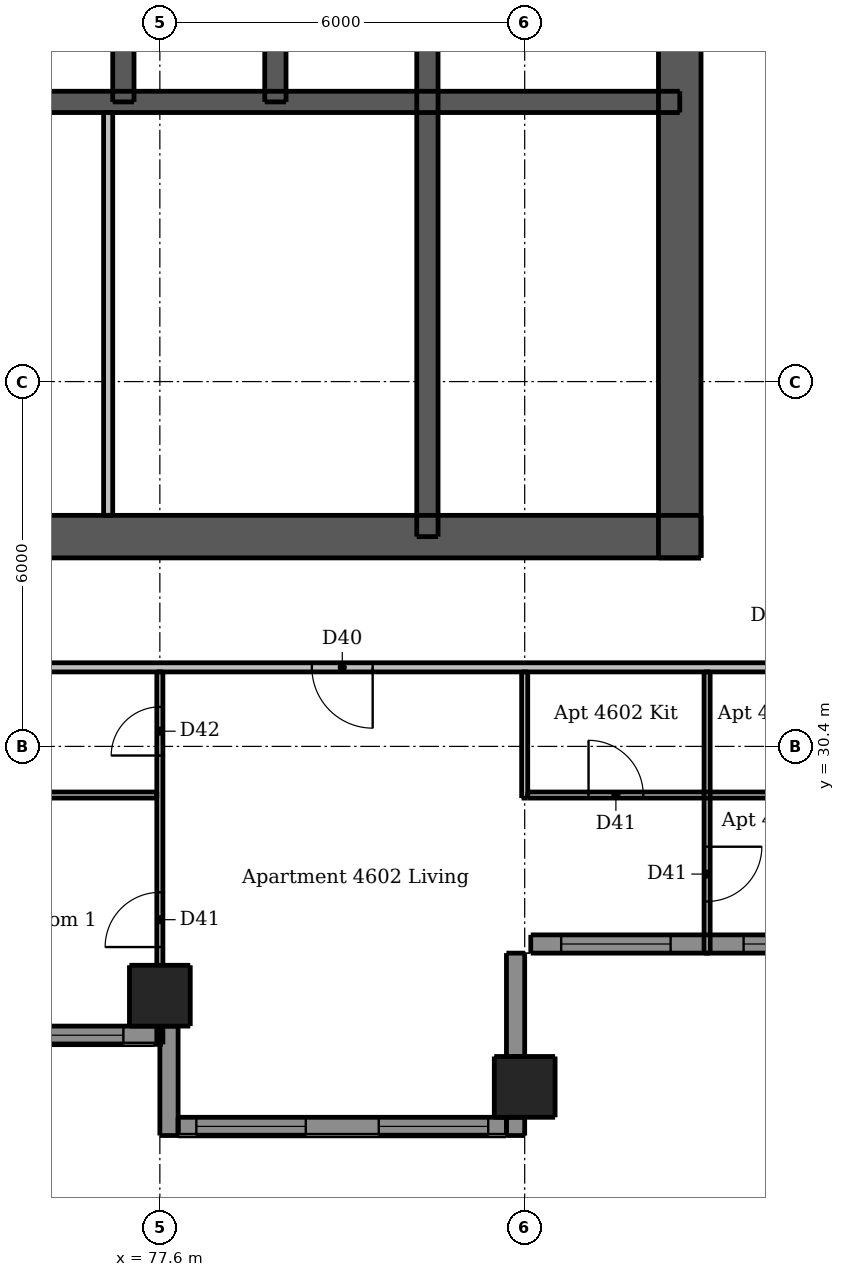
"""IFC4 building model, lengths in metres.
Left out: names, types, materials, properties, quantities, classifications, styles, units other than length and angle.
Written with IfcOpenShell. Run it as: python <this file> out.ifc"""

import sys

from ifc_helpers import new_model, si_unit, direction, frame, frame_2d, origin, origin_2d, place, context, subcontext, project, spatial, rectangle, extrude, element, fill, save


model = new_model("IFC4")
c1 = context("Model", 3, precision=1e-05, world=origin(), true_north=direction((0.0, 1.0)))
c2 = subcontext(c1, "Body", "Model", "MODEL_VIEW")
j1 = project(units=[si_unit("LENGTHUNIT", "METRE"), si_unit("PLANEANGLEUNIT", "RADIAN")], contexts=[c1])
p1 = place(None, origin())
s1 = spatial("IfcSite", under=j1, at=p1, CompositionType="ELEMENT")
p2 = place(p1, origin())
s2 = spatial("IfcBuilding", under=s1, at=p2, CompositionType="ELEMENT")
p3 = place(p2, frame((0.0, 0.0, 171.4)))
s3 = spatial("IfcBuildingStorey", under=s2, at=p3, CompositionType="ELEMENT", Elevation=171.4)
p4 = place(p3, frame((62.5, 33.85, 0.0), z_axis=(0.0, 0.0, 1.0), x_axis=(1.0, 0.0, 0.0)))
e1 = element("IfcWall", 1, at=p4, inside=s3, PredefinedType="SHEAR", context=c2, shape_type="SweptSolid", body=[
    extrude(rectangle(XDim=24.0, YDim=0.7, at=frame_2d((12.0, 0.0))), origin(), (0.0, 0.0, 1.0), 3.05),
])
p5 = place(p4, frame((1.962, 0.0, 0.0)))
e2 = element("IfcOpeningElement", 2, at=p5, cuts=e1, PredefinedType="OPENING", context=c2, shape_type="SweptSolid", body=[
    extrude(rectangle(XDim=1.1, YDim=2.1, at=frame_2d((0.55, 1.05))), frame((0.0, 0.36, 0.0), z_axis=(0.0, -1.0, 0.0), x_axis=(1.0, 0.0, 0.0)), (0.0, 0.0, 1.0), 0.72),
])
p6 = place(p4, frame((20.938, 0.0, 0.0)))
e3 = element("IfcOpeningElement", 3, at=p6, cuts=e1, PredefinedType="OPENING", context=c2, shape_type="SweptSolid", body=[
    extrude(rectangle(XDim=1.1, YDim=2.1, at=frame_2d((0.55, 1.05))), frame((0.0, 0.36, 0.0), z_axis=(0.0, -1.0, 0.0), x_axis=(1.0, 0.0, 0.0)), (0.0, 0.0, 1.0), 0.72),
])
p7 = place(p4, frame((8.0, 0.0, 0.0)))
e4 = element("IfcOpeningElement", 4, at=p7, cuts=e1, PredefinedType="OPENING", context=c2, shape_type="SweptSolid", body=[
    extrude(rectangle(XDim=1.1, YDim=2.1, at=frame_2d((0.55, 1.05))), frame((0.0, 0.36, 0.0), z_axis=(0.0, -1.0, 0.0), x_axis=(1.0, 0.0, 0.0)), (0.0, 0.0, 1.0), 0.72),
])
p8 = place(p4, frame((16.375, 0.0, 0.0)))
e5 = element("IfcOpeningElement", 5, at=p8, cuts=e1, PredefinedType="OPENING", context=c2, shape_type="SweptSolid", body=[
    extrude(rectangle(XDim=0.9, YDim=2.1, at=frame_2d((0.45, 1.05))), frame((0.0, 0.36, 0.0), z_axis=(0.0, -1.0, 0.0), x_axis=(1.0, 0.0, 0.0)), (0.0, 0.0, 1.0), 0.72),
])
p9 = place(p3, frame((86.15, 33.5, 0.0), z_axis=(0.0, 0.0, 1.0), x_axis=(0.0, 1.0, 0.0)))
e6 = element("IfcWall", 6, at=p9, inside=s3, PredefinedType="SHEAR", context=c2, shape_type="SweptSolid", body=[
    extrude(rectangle(XDim=24.0, YDim=0.7, at=frame_2d((12.0, 0.0))), origin(), (0.0, 0.0, 1.0), 3.05),
])
p10 = place(p9, frame((11.2, 0.0, 0.0)))
e7 = element("IfcOpeningElement", 7, at=p10, cuts=e6, PredefinedType="OPENING", context=c2, shape_type="SweptSolid", body=[
    extrude(rectangle(XDim=1.6, YDim=2.1, at=frame_2d((0.8, 1.05))), frame((0.0, 0.36, 0.0), z_axis=(0.0, -1.0, 0.0), x_axis=(1.0, 0.0, 0.0)), (0.0, 0.0, 1.0), 0.72),
])
p11 = place(p3, frame((62.85, 41.0, 0.0), z_axis=(0.0, 0.0, 1.0), x_axis=(1.0, 0.0, 0.0)))
e8 = element("IfcWall", 8, at=p11, inside=s3, PredefinedType="SHEAR", context=c2, shape_type="SweptSolid", body=[
    extrude(rectangle(XDim=23.3, YDim=0.35, at=frame_2d((11.65, 0.0))), origin(), (0.0, 0.0, 1.0), 3.05),
])
p12 = place(p3, frame((82.0, 33.85, 0.0), z_axis=(0.0, 0.0, 1.0), x_axis=(0.0, 1.0, 0.0)))
e9 = element("IfcWall", 9, at=p12, inside=s3, PredefinedType="SHEAR", context=c2, shape_type="SweptSolid", body=[
    extrude(rectangle(XDim=10.05, YDim=0.35, at=frame_2d((5.025, 0.0))), origin(), (0.0, 0.0, 1.0), 3.05),
])
for number, where, z_axis, x_axis in (
    (10, (77.0, 41.0, 0.0), (0.0, 0.0, 1.0), (0.0, 1.0, 0.0)),
    (11, (79.5, 41.0, 0.0), (0.0, 0.0, 1.0), (0.0, 1.0, 0.0)),
):
    element("IfcWall", number, at=place(p3, frame(where, z_axis=z_axis, x_axis=x_axis)), inside=s3, PredefinedType="SHEAR", context=c2, shape_type="SweptSolid", body=[
        extrude(rectangle(XDim=2.9, YDim=0.35, at=frame_2d((1.45, 0.0))), origin(), (0.0, 0.0, 1.0), 3.05),
    ])
for number, where, z_axis, x_axis in (
    (12, (77.6, 26.3, 0.0), (0.0, 0.0, 1.0), (1.0, 0.0, 0.0)),
    (13, (83.6, 24.8, 0.0), (0.0, 0.0, 1.0), (1.0, 0.0, 0.0)),
):
    element("IfcColumn", number, at=place(p3, frame(where, z_axis=z_axis, x_axis=x_axis)), inside=s3, PredefinedType="COLUMN", context=c2, shape_type="SweptSolid", body=[
        extrude(rectangle(XDim=1.0, YDim=1.0, at=origin_2d()), origin(), (0.0, 0.0, 1.0), 3.05),
    ])
p13 = place(p3, frame((77.75, 25.8, 0.0), z_axis=(0.0, 0.0, 1.0), x_axis=(0.0, -1.0, 0.0)))
e14 = element("IfcWall", 14, at=p13, inside=s3, PredefinedType="SOLIDWALL", context=c2, shape_type="SweptSolid", body=[
    extrude(rectangle(XDim=1.8, YDim=0.3, at=frame_2d((0.9, 0.0))), origin(), (0.0, 0.0, 1.0), 3.05),
])
p14 = place(p3, frame((83.45, 24.0, 0.0), z_axis=(0.0, 0.0, 1.0), x_axis=(0.0, 1.0, 0.0)))
e15 = element("IfcWall", 15, at=p14, inside=s3, PredefinedType="SOLIDWALL", context=c2, shape_type="SweptSolid", body=[
    extrude(rectangle(XDim=0.3, YDim=0.3, at=frame_2d((0.15, 0.0))), origin(), (0.0, 0.0, 1.0), 3.05),
])
p15 = place(p3, frame((83.45, 25.3, 0.0), z_axis=(0.0, 0.0, 1.0), x_axis=(0.0, 1.0, 0.0)))
e16 = element("IfcWall", 16, at=p15, inside=s3, PredefinedType="SOLIDWALL", context=c2, shape_type="SweptSolid", body=[
    extrude(rectangle(XDim=1.7, YDim=0.3, at=frame_2d((0.85, 0.0))), origin(), (0.0, 0.0, 1.0), 3.05),
])
p16 = place(p3, frame((71.6, 25.65, 0.0), z_axis=(0.0, 0.0, 1.0), x_axis=(1.0, 0.0, 0.0)))
e17 = element("IfcWall", 17, at=p16, inside=s3, PredefinedType="SOLIDWALL", context=c2, shape_type="SweptSolid", body=[
    extrude(rectangle(XDim=6.0, YDim=0.3, at=frame_2d((3.0, 0.0))), origin(), (0.0, 0.0, 1.0), 3.05),
])
p17 = place(p16, frame((0.6, 0.0, 0.15)))
e18 = element("IfcOpeningElement", 18, at=p17, cuts=e17, PredefinedType="OPENING", context=c2, shape_type="SweptSolid", body=[
    extrude(rectangle(XDim=1.8, YDim=2.1, at=frame_2d((0.9, 1.05))), frame((0.0, 0.16, 0.0), z_axis=(0.0, -1.0, 0.0), x_axis=(1.0, 0.0, 0.0)), (0.0, 0.0, 1.0), 0.32),
])
p18 = place(p16, frame((3.6, 0.0, 0.15)))
e19 = element("IfcOpeningElement", 19, at=p18, cuts=e17, PredefinedType="OPENING", context=c2, shape_type="SweptSolid", body=[
    extrude(rectangle(XDim=1.8, YDim=2.1, at=frame_2d((0.9, 1.05))), frame((0.0, 0.16, 0.0), z_axis=(0.0, -1.0, 0.0), x_axis=(1.0, 0.0, 0.0)), (0.0, 0.0, 1.0), 0.32),
])
p19 = place(p3, frame((77.9, 24.15, 0.0), z_axis=(0.0, 0.0, 1.0), x_axis=(1.0, 0.0, 0.0)))
e20 = element("IfcWall", 20, at=p19, inside=s3, PredefinedType="SOLIDWALL", context=c2, shape_type="SweptSolid", body=[
    extrude(rectangle(XDim=5.4, YDim=0.3, at=frame_2d((2.7, 0.0))), origin(), (0.0, 0.0, 1.0), 3.05),
])
p20 = place(p19, frame((0.3, 0.0, 0.15)))
e21 = element("IfcOpeningElement", 21, at=p20, cuts=e20, PredefinedType="OPENING", context=c2, shape_type="SweptSolid", body=[
    extrude(rectangle(XDim=1.8, YDim=2.1, at=frame_2d((0.9, 1.05))), frame((0.0, 0.16, 0.0), z_axis=(0.0, -1.0, 0.0), x_axis=(1.0, 0.0, 0.0)), (0.0, 0.0, 1.0), 0.32),
])
p21 = place(p19, frame((3.3, 0.0, 0.15)))
e22 = element("IfcOpeningElement", 22, at=p21, cuts=e20, PredefinedType="OPENING", context=c2, shape_type="SweptSolid", body=[
    extrude(rectangle(XDim=1.8, YDim=2.1, at=frame_2d((0.9, 1.05))), frame((0.0, 0.16, 0.0), z_axis=(0.0, -1.0, 0.0), x_axis=(1.0, 0.0, 0.0)), (0.0, 0.0, 1.0), 0.32),
])
p22 = place(p3, frame((83.7, 27.15, 0.0), z_axis=(0.0, 0.0, 1.0), x_axis=(1.0, 0.0, 0.0)))
e23 = element("IfcWall", 23, at=p22, inside=s3, PredefinedType="SOLIDWALL", context=c2, shape_type="SweptSolid", body=[
    extrude(rectangle(XDim=5.79, YDim=0.3, at=frame_2d((2.895, 0.0))), origin(), (0.0, 0.0, 1.0), 3.05),
])
p23 = place(p22, frame((0.5, 0.0, 0.15)))
e24 = element("IfcOpeningElement", 24, at=p23, cuts=e23, PredefinedType="OPENING", context=c2, shape_type="SweptSolid", body=[
    extrude(rectangle(XDim=1.8, YDim=2.1, at=frame_2d((0.9, 1.05))), frame((0.0, 0.16, 0.0), z_axis=(0.0, -1.0, 0.0), x_axis=(1.0, 0.0, 0.0)), (0.0, 0.0, 1.0), 0.32),
])
p24 = place(p22, frame((3.5, 0.0, 0.15)))
e25 = element("IfcOpeningElement", 25, at=p24, cuts=e23, PredefinedType="OPENING", context=c2, shape_type="SweptSolid", body=[
    extrude(rectangle(XDim=1.8, YDim=2.1, at=frame_2d((0.9, 1.05))), frame((0.0, 0.16, 0.0), z_axis=(0.0, -1.0, 0.0), x_axis=(1.0, 0.0, 0.0)), (0.0, 0.0, 1.0), 0.32),
])
p25 = place(p3, frame((76.75, 34.2, 0.0), z_axis=(0.0, 0.0, 1.0), x_axis=(0.0, 1.0, 0.0)))
e26 = element("IfcWall", 26, at=p25, inside=s3, PredefinedType="PLUMBINGWALL", context=c2, shape_type="SweptSolid", body=[
    extrude(rectangle(XDim=6.625, YDim=0.15, at=frame_2d((3.312, 0.0))), origin(), (0.0, 0.0, 1.0), 3.05),
])
p26 = place(p3, frame((77.6, 25.5, 0.0), z_axis=(0.0, 0.0, 1.0), x_axis=(0.0, 1.0, 0.0)))
e27 = element("IfcWall", 27, at=p26, inside=s3, PredefinedType="PARTITIONING", context=c2, shape_type="SweptSolid", body=[
    extrude(rectangle(XDim=6.125, YDim=0.1, at=frame_2d((3.062, 0.0))), origin(), (0.0, 0.0, 1.0), 2.59),
])
p27 = place(p26, frame((1.6, 0.0, 0.0)))
e28 = element("IfcOpeningElement", 28, at=p27, cuts=e27, PredefinedType="OPENING", context=c2, shape_type="SweptSolid", body=[
    extrude(rectangle(XDim=0.9, YDim=2.1, at=frame_2d((0.45, 1.05))), frame((0.0, 0.06, 0.0), z_axis=(0.0, -1.0, 0.0), x_axis=(1.0, 0.0, 0.0)), (0.0, 0.0, 1.0), 0.12),
])
p28 = place(p26, frame((4.75, 0.0, 0.0)))
e29 = element("IfcOpeningElement", 29, at=p28, cuts=e27, PredefinedType="OPENING", context=c2, shape_type="SweptSolid", body=[
    extrude(rectangle(XDim=0.8, YDim=2.1, at=frame_2d((0.4, 1.05))), frame((0.0, 0.06, 0.0), z_axis=(0.0, -1.0, 0.0), x_axis=(1.0, 0.0, 0.0)), (0.0, 0.0, 1.0), 0.12),
])
p29 = place(p3, frame((83.6, 29.55, 0.0), z_axis=(0.0, 0.0, 1.0), x_axis=(0.0, 1.0, 0.0)))
e30 = element("IfcWall", 30, at=p29, inside=s3, PredefinedType="PARTITIONING", context=c2, shape_type="SweptSolid", body=[
    extrude(rectangle(XDim=2.075, YDim=0.1, at=frame_2d((1.038, 0.0))), origin(), (0.0, 0.0, 1.0), 2.59),
])
p30 = place(p3, frame((86.6, 31.625, 0.0), z_axis=(0.0, 0.0, 1.0), x_axis=(0.0, -1.0, 0.0)))
e31 = element("IfcWall", 31, at=p30, inside=s3, PredefinedType="PARTITIONING", context=c2, shape_type="SweptSolid", body=[
    extrude(rectangle(XDim=4.625, YDim=0.1, at=frame_2d((2.312, 0.0))), origin(), (0.0, 0.0, 1.0), 3.05),
])
p31 = place(p30, frame((2.875, 0.0, 0.0)))
e32 = element("IfcOpeningElement", 32, at=p31, cuts=e31, PredefinedType="OPENING", context=c2, shape_type="SweptSolid", body=[
    extrude(rectangle(XDim=0.9, YDim=2.1, at=frame_2d((0.45, 1.05))), frame((0.0, 0.06, 0.0), z_axis=(0.0, -1.0, 0.0), x_axis=(1.0, 0.0, 0.0)), (0.0, 0.0, 1.0), 0.12),
])
p32 = place(p3, frame((74.05, 29.6, 0.0), z_axis=(0.0, 0.0, 1.0), x_axis=(1.0, 0.0, 0.0)))
e33 = element("IfcWall", 33, at=p32, inside=s3, PredefinedType="PARTITIONING", context=c2, shape_type="SweptSolid", body=[
    extrude(rectangle(XDim=3.5, YDim=0.1, at=frame_2d((1.75, 0.0))), origin(), (0.0, 0.0, 1.0), 3.05),
])
p33 = place(p3, frame((83.65, 29.6, 0.0), z_axis=(0.0, 0.0, 1.0), x_axis=(1.0, 0.0, 0.0)))
e34 = element("IfcWall", 34, at=p33, inside=s3, PredefinedType="PARTITIONING", context=c2, shape_type="SweptSolid", body=[
    extrude(rectangle(XDim=5.875, YDim=0.1, at=frame_2d((2.938, 0.0))), origin(), (0.0, 0.0, 1.0), 3.05),
])
p34 = place(p33, frame((1.0, 0.0, 0.0)))
e35 = element("IfcOpeningElement", 35, at=p34, cuts=e34, PredefinedType="OPENING", context=c2, shape_type="SweptSolid", body=[
    extrude(rectangle(XDim=0.9, YDim=2.1, at=frame_2d((0.45, 1.05))), frame((0.0, 0.06, 0.0), z_axis=(0.0, -1.0, 0.0), x_axis=(1.0, 0.0, 0.0)), (0.0, 0.0, 1.0), 0.12),
])
p35 = place(p33, frame((4.05, 0.0, 0.0)))
e36 = element("IfcOpeningElement", 36, at=p35, cuts=e34, PredefinedType="OPENING", context=c2, shape_type="SweptSolid", body=[
    extrude(rectangle(XDim=0.8, YDim=2.1, at=frame_2d((0.4, 1.05))), frame((0.0, 0.06, 0.0), z_axis=(0.0, -1.0, 0.0), x_axis=(1.0, 0.0, 0.0)), (0.0, 0.0, 1.0), 0.12),
])
p36 = place(p3, frame((89.525, 31.7, 0.0), z_axis=(0.0, 0.0, 1.0), x_axis=(-1.0, 0.0, 0.0)))
e37 = element("IfcWall", 37, at=p36, inside=s3, PredefinedType="PARTITIONING", context=c2, shape_type="SweptSolid", body=[
    extrude(rectangle(XDim=30.55, YDim=0.15, at=frame_2d((15.275, 0.0))), origin(), (0.0, 0.0, 1.0), 3.05),
])
p37 = place(p36, frame((26.775, 0.0, 0.0)))
e38 = element("IfcOpeningElement", 38, at=p37, cuts=e37, PredefinedType="OPENING", context=c2, shape_type="SweptSolid", body=[
    extrude(rectangle(XDim=1.0, YDim=2.1, at=frame_2d((0.5, 1.05))), frame((0.0, 0.085, 0.0), z_axis=(0.0, -1.0, 0.0), x_axis=(1.0, 0.0, 0.0)), (0.0, 0.0, 1.0), 0.17),
])
p38 = place(p36, frame((8.425, 0.0, 0.0)))
e39 = element("IfcOpeningElement", 39, at=p38, cuts=e37, PredefinedType="OPENING", context=c2, shape_type="SweptSolid", body=[
    extrude(rectangle(XDim=1.0, YDim=2.1, at=frame_2d((0.5, 1.05))), frame((0.0, 0.085, 0.0), z_axis=(0.0, -1.0, 0.0), x_axis=(1.0, 0.0, 0.0)), (0.0, 0.0, 1.0), 0.17),
])
p39 = place(p18, origin())
e40 = element("IfcWindow", 40, at=p39, inside=s3, PartitioningType="DOUBLE_PANEL_VERTICAL", PredefinedType="WINDOW", context=c2, shape_type="SweptSolid", body=[
    extrude(rectangle(XDim=1.8, YDim=2.1, at=frame_2d((0.9, 1.05))), frame((0.0, 0.03, 0.0), z_axis=(0.0, -1.0, 0.0), x_axis=(1.0, 0.0, 0.0)), (0.0, 0.0, 1.0), 0.06),
])
fill(e19, e40)
p40 = place(p20, origin())
e41 = element("IfcWindow", 41, at=p40, inside=s3, PartitioningType="DOUBLE_PANEL_VERTICAL", PredefinedType="WINDOW", context=c2, shape_type="SweptSolid", body=[
    extrude(rectangle(XDim=1.8, YDim=2.1, at=frame_2d((0.9, 1.05))), frame((0.0, 0.03, 0.0), z_axis=(0.0, -1.0, 0.0), x_axis=(1.0, 0.0, 0.0)), (0.0, 0.0, 1.0), 0.06),
])
fill(e21, e41)
p41 = place(p21, origin())
e42 = element("IfcWindow", 42, at=p41, inside=s3, PartitioningType="DOUBLE_PANEL_VERTICAL", PredefinedType="WINDOW", context=c2, shape_type="SweptSolid", body=[
    extrude(rectangle(XDim=1.8, YDim=2.1, at=frame_2d((0.9, 1.05))), frame((0.0, 0.03, 0.0), z_axis=(0.0, -1.0, 0.0), x_axis=(1.0, 0.0, 0.0)), (0.0, 0.0, 1.0), 0.06),
])
fill(e22, e42)
p42 = place(p23, origin())
e43 = element("IfcWindow", 43, at=p42, inside=s3, PartitioningType="DOUBLE_PANEL_VERTICAL", PredefinedType="WINDOW", context=c2, shape_type="SweptSolid", body=[
    extrude(rectangle(XDim=1.8, YDim=2.1, at=frame_2d((0.9, 1.05))), frame((0.0, 0.03, 0.0), z_axis=(0.0, -1.0, 0.0), x_axis=(1.0, 0.0, 0.0)), (0.0, 0.0, 1.0), 0.06),
])
fill(e24, e43)
p43 = place(p24, origin())
e44 = element("IfcWindow", 44, at=p43, inside=s3, PartitioningType="DOUBLE_PANEL_VERTICAL", PredefinedType="WINDOW", context=c2, shape_type="SweptSolid", body=[
    extrude(rectangle(XDim=1.8, YDim=2.1, at=frame_2d((0.9, 1.05))), frame((0.0, 0.03, 0.0), z_axis=(0.0, -1.0, 0.0), x_axis=(1.0, 0.0, 0.0)), (0.0, 0.0, 1.0), 0.06),
])
fill(e25, e44)
p44 = place(p6, origin())
e45 = element("IfcDoor", 45, at=p44, inside=s3, OperationType="SINGLE_SWING_RIGHT", PredefinedType="DOOR", context=c2, shape_type="SweptSolid", body=[
    extrude(rectangle(XDim=1.1, YDim=2.1, at=frame_2d((0.55, 1.05))), frame((0.0, 0.337, 0.0), z_axis=(0.0, -1.0, 0.0), x_axis=(1.0, 0.0, 0.0)), (0.0, 0.0, 1.0), 0.05),
])
fill(e3, e45)
p45 = place(p8, origin())
e46 = element("IfcDoor", 46, at=p45, inside=s3, OperationType="SINGLE_SWING_LEFT", PredefinedType="DOOR", context=c2, shape_type="SweptSolid", body=[
    extrude(rectangle(XDim=0.9, YDim=2.1, at=frame_2d((0.45, 1.05))), frame((0.0, 0.337, 0.0), z_axis=(0.0, -1.0, 0.0), x_axis=(1.0, 0.0, 0.0)), (0.0, 0.0, 1.0), 0.05),
])
fill(e5, e46)
p46 = place(p38, origin())
e47 = element("IfcDoor", 47, at=p46, inside=s3, OperationType="SINGLE_SWING_LEFT", PredefinedType="DOOR", context=c2, shape_type="SweptSolid", body=[
    extrude(rectangle(XDim=1.0, YDim=2.1, at=frame_2d((0.5, 1.05))), frame((0.0, 0.025, 0.0), z_axis=(0.0, -1.0, 0.0), x_axis=(1.0, 0.0, 0.0)), (0.0, 0.0, 1.0), 0.05),
])
fill(e39, e47)
p47 = place(p34, origin())
e48 = element("IfcDoor", 48, at=p47, inside=s3, OperationType="SINGLE_SWING_LEFT", PredefinedType="DOOR", context=c2, shape_type="SweptSolid", body=[
    extrude(rectangle(XDim=0.9, YDim=2.1, at=frame_2d((0.45, 1.05))), frame((0.0, 0.025, 0.0), z_axis=(0.0, -1.0, 0.0), x_axis=(1.0, 0.0, 0.0)), (0.0, 0.0, 1.0), 0.05),
])
fill(e35, e48)
p48 = place(p27, origin())
e49 = element("IfcDoor", 49, at=p48, inside=s3, OperationType="SINGLE_SWING_LEFT", PredefinedType="DOOR", context=c2, shape_type="SweptSolid", body=[
    extrude(rectangle(XDim=0.9, YDim=2.1, at=frame_2d((0.45, 1.05))), frame((0.0, 0.025, 0.0), z_axis=(0.0, -1.0, 0.0), x_axis=(1.0, 0.0, 0.0)), (0.0, 0.0, 1.0), 0.05),
])
fill(e28, e49)
p49 = place(p28, origin())
e50 = element("IfcDoor", 50, at=p49, inside=s3, OperationType="SINGLE_SWING_LEFT", PredefinedType="DOOR", context=c2, shape_type="SweptSolid", body=[
    extrude(rectangle(XDim=0.8, YDim=2.1, at=frame_2d((0.4, 1.05))), frame((0.0, 0.025, 0.0), z_axis=(0.0, -1.0, 0.0), x_axis=(1.0, 0.0, 0.0)), (0.0, 0.0, 1.0), 0.05),
])
fill(e29, e50)
p50 = place(p31, origin())
e51 = element("IfcDoor", 51, at=p50, inside=s3, OperationType="SINGLE_SWING_LEFT", PredefinedType="DOOR", context=c2, shape_type="SweptSolid", body=[
    extrude(rectangle(XDim=0.9, YDim=2.1, at=frame_2d((0.45, 1.05))), frame((0.0, 0.025, 0.0), z_axis=(0.0, -1.0, 0.0), x_axis=(1.0, 0.0, 0.0)), (0.0, 0.0, 1.0), 0.05),
])
fill(e32, e51)
save(model, sys.argv[1])
